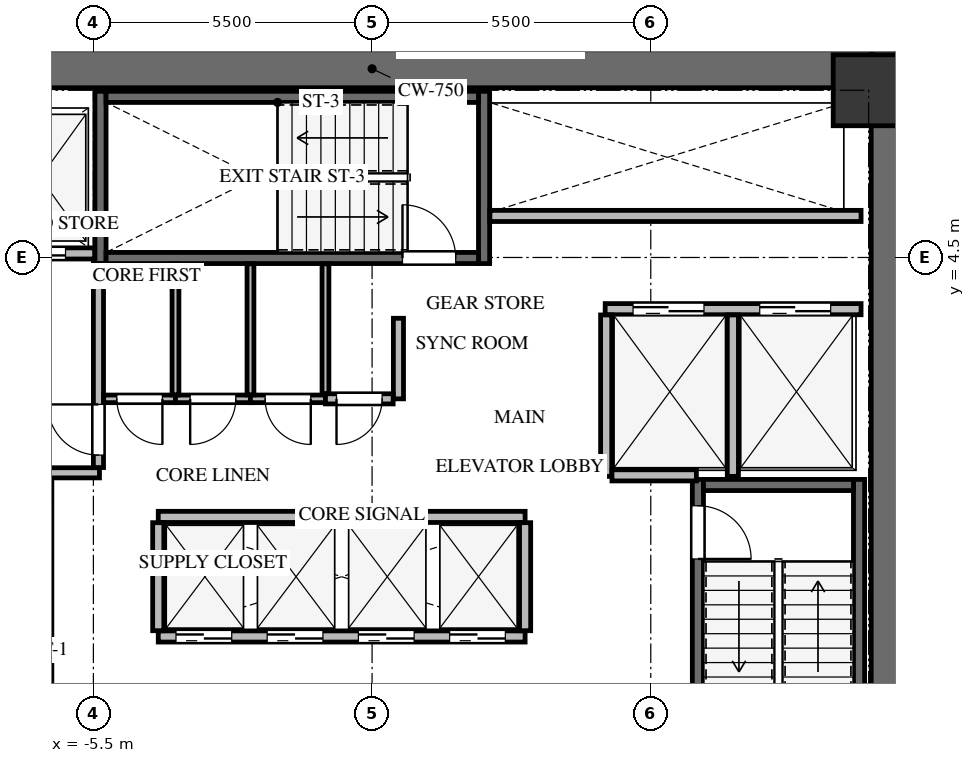
"""IFC4 building model, lengths in metres.
Left out: names, types, materials, properties, quantities, classifications, styles, units other than length and angle.
Written with IfcOpenShell. Run it as: python <this file> out.ifc"""

import sys

from ifc_helpers import new_model, si_unit, direction, frame, frame_2d, origin, origin_2d, place, context, subcontext, project, spatial, rectangle, extrude, source, transform, mapped, element, fill, save


model = new_model("IFC4")
c1 = context("Model", 3, precision=1e-05, world=origin(), true_north=direction((0.0, 1.0)))
c2 = subcontext(c1, "Body", "Model", "MODEL_VIEW")
j1 = project(units=[si_unit("LENGTHUNIT", "METRE"), si_unit("PLANEANGLEUNIT", "RADIAN")], contexts=[c1])
p1 = place(None, origin())
s1 = spatial("IfcSite", under=j1, at=p1, CompositionType="ELEMENT")
p2 = place(p1, origin())
s2 = spatial("IfcBuilding", under=s1, at=p2, CompositionType="ELEMENT")
p3 = place(p2, frame((0.0, 0.0, 110.7)))
s3 = spatial("IfcBuildingStorey", under=s2, at=p3, CompositionType="ELEMENT", Elevation=110.7)
p4 = place(p3, frame((10.225, -8.6, 0.0), z_axis=(0.0, 0.0, 1.0), x_axis=(0.0, 1.0, 0.0)))
e1 = element("IfcWall", 1, at=p4, inside=s3, PredefinedType="SHEAR", context=c2, shape_type="SweptSolid", body=[
    extrude(rectangle(XDim=17.2, YDim=0.75, at=frame_2d((8.6, 0.0))), origin(), (0.0, 0.0, 1.0), 3.3),
])
p5 = place(p3, frame((-9.85, 8.225, 0.0), z_axis=(0.0, 0.0, 1.0), x_axis=(1.0, 0.0, 0.0)))
e2 = element("IfcWall", 2, at=p5, inside=s3, PredefinedType="SHEAR", context=c2, shape_type="SweptSolid", body=[
    extrude(rectangle(XDim=19.7, YDim=0.75, at=frame_2d((9.85, 0.0))), origin(), (0.0, 0.0, 1.0), 3.3),
])
p6 = place(p3, frame((-6.43, -7.77, -0.24), z_axis=(0.0, 0.0, 1.0), x_axis=(0.0, 1.0, 0.0)))
e3 = element("IfcWall", 3, at=p6, inside=s3, PredefinedType="SHEAR", context=c2, shape_type="SweptSolid", body=[
    extrude(rectangle(XDim=7.89, YDim=0.22, at=frame_2d((3.945, 0.0))), origin(), (0.0, 0.0, 1.0), 3.3),
])
p7 = place(p6, frame((6.32, 0.0, 0.0)))
e4 = element("IfcOpeningElement", 4, at=p7, cuts=e3, PredefinedType="OPENING", context=c2, shape_type="SweptSolid", body=[
    extrude(rectangle(XDim=1.05, YDim=2.15, at=frame_2d((0.525, 1.075))), frame((0.0, 0.12, 0.0), z_axis=(0.0, -1.0, 0.0), x_axis=(1.0, 0.0, 0.0)), (0.0, 0.0, 1.0), 0.24),
])
p8 = place(p3, frame((9.61, -7.77, -0.24), z_axis=(0.0, 0.0, 1.0), x_axis=(0.0, 1.0, 0.0)))
e5 = element("IfcWall", 5, at=p8, inside=s3, PredefinedType="SHEAR", context=c2, shape_type="SweptSolid", body=[
    extrude(rectangle(XDim=7.89, YDim=0.22, at=frame_2d((3.945, 0.0))), origin(), (0.0, 0.0, 1.0), 3.3),
])
p9 = place(p3, frame((6.43, 0.12, -0.24), z_axis=(0.0, 0.0, 1.0), x_axis=(0.0, -1.0, 0.0)))
e6 = element("IfcWall", 6, at=p9, inside=s3, PredefinedType="SHEAR", context=c2, shape_type="SweptSolid", body=[
    extrude(rectangle(XDim=7.89, YDim=0.22, at=frame_2d((3.945, 0.0))), origin(), (0.0, 0.0, 1.0), 3.3),
])
p10 = place(p9, frame((0.52, 0.0, 0.0)))
e7 = element("IfcOpeningElement", 7, at=p10, cuts=e6, PredefinedType="OPENING", context=c2, shape_type="SweptSolid", body=[
    extrude(rectangle(XDim=1.05, YDim=2.15, at=frame_2d((0.525, 1.075))), frame((0.0, 0.12, 0.0), z_axis=(0.0, -1.0, 0.0), x_axis=(1.0, 0.0, 0.0)), (0.0, 0.0, 1.0), 0.24),
])
p11 = place(p3, frame((9.5, 0.01, -0.24), z_axis=(0.0, 0.0, 1.0), x_axis=(-1.0, 0.0, 0.0)))
e8 = element("IfcWall", 8, at=p11, inside=s3, PredefinedType="SHEAR", context=c2, shape_type="SweptSolid", body=[
    extrude(rectangle(XDim=2.96, YDim=0.22, at=frame_2d((1.48, 0.0))), origin(), (0.0, 0.0, 1.0), 3.3),
])
for number, where, z_axis, x_axis in (
    (9, (2.21, 4.38, -0.24), (0.0, 0.0, 1.0), (0.0, 1.0, 0.0)),
    (10, (-5.36, 7.78, -0.24), (0.0, 0.0, 1.0), (0.0, -1.0, 0.0)),
):
    element("IfcWall", number, at=place(p3, frame(where, z_axis=z_axis, x_axis=x_axis)), inside=s3, PredefinedType="SHEAR", context=c2, shape_type="SweptSolid", body=[
        extrude(rectangle(XDim=3.4, YDim=0.22, at=frame_2d((1.7, 0.0))), origin(), (0.0, 0.0, 1.0), 3.3),
    ])
p12 = place(p3, frame((-5.25, 4.49, -0.24), z_axis=(0.0, 0.0, 1.0), x_axis=(1.0, 0.0, 0.0)))
e11 = element("IfcWall", 11, at=p12, inside=s3, PredefinedType="SHEAR", context=c2, shape_type="SweptSolid", body=[
    extrude(rectangle(XDim=7.35, YDim=0.22, at=frame_2d((3.675, 0.0))), origin(), (0.0, 0.0, 1.0), 3.3),
])
p13 = place(p12, frame((5.85, 0.0, 0.0)))
e12 = element("IfcOpeningElement", 12, at=p13, cuts=e11, PredefinedType="OPENING", context=c2, shape_type="SweptSolid", body=[
    extrude(rectangle(XDim=1.05, YDim=2.15, at=frame_2d((0.525, 1.075))), frame((0.0, 0.12, 0.0), z_axis=(0.0, -1.0, 0.0), x_axis=(1.0, 0.0, 0.0)), (0.0, 0.0, 1.0), 0.24),
])
p14 = place(p3, frame((2.1, 7.67, -0.24), z_axis=(0.0, 0.0, 1.0), x_axis=(-1.0, 0.0, 0.0)))
e13 = element("IfcWall", 13, at=p14, inside=s3, PredefinedType="SHEAR", context=c2, shape_type="SweptSolid", body=[
    extrude(rectangle(XDim=7.35, YDim=0.22, at=frame_2d((3.675, 0.0))), origin(), (0.0, 0.0, 1.0), 3.3),
])
m1 = source(origin(), c2, "Body", "SweptSolid", [
    extrude(rectangle(XDim=1.4, YDim=1.4, at=origin_2d()), origin(), (0.0, 0.0, 1.0), 3.3),
])
p15 = place(p3, frame((9.8, 7.8, -0.24), z_axis=(0.0, 0.0, 1.0), x_axis=(1.0, 0.0, 0.0)))
e14 = element("IfcColumn", 14, at=p15, inside=s3, PredefinedType="COLUMN", context=c2, shape_type="MappedRepresentation", body=[
    mapped(m1, transform((0.0, 0.0, 0.0), x_axis=(1.0, 0.0, 0.0), y_axis=(0.0, 1.0, 0.0), z_axis=(0.0, 0.0, 1.0), scale=1.0)),
])
p16 = place(p3, frame((-9.65, 4.58, 0.0), z_axis=(0.0, 0.0, 1.0), x_axis=(1.0, 0.0, 0.0)))
e15 = element("IfcWall", 15, at=p16, inside=s3, PredefinedType="SOLIDWALL", context=c2, shape_type="SweptSolid", body=[
    extrude(rectangle(XDim=4.175, YDim=0.22, at=frame_2d((2.087, 0.0))), origin(), (0.0, 0.0, 1.0), 3.045),
])
p17 = place(p16, frame((0.4, 0.0, 0.0)))
e16 = element("IfcOpeningElement", 16, at=p17, cuts=e15, PredefinedType="OPENING", context=c2, shape_type="SweptSolid", body=[
    extrude(rectangle(XDim=1.2, YDim=2.15, at=frame_2d((0.6, 1.075))), frame((0.0, 0.12, 0.0), z_axis=(0.0, -1.0, 0.0), x_axis=(1.0, 0.0, 0.0)), (0.0, 0.0, 1.0), 0.24),
])
p18 = place(p16, frame((2.4, 0.0, 0.0)))
e17 = element("IfcOpeningElement", 17, at=p18, cuts=e15, PredefinedType="OPENING", context=c2, shape_type="SweptSolid", body=[
    extrude(rectangle(XDim=1.2, YDim=2.15, at=frame_2d((0.6, 1.075))), frame((0.0, 0.12, 0.0), z_axis=(0.0, -1.0, 0.0), x_axis=(1.0, 0.0, 0.0)), (0.0, 0.0, 1.0), 0.24),
])
p19 = place(p3, frame((-9.65, 0.25, 0.0), z_axis=(0.0, 0.0, 1.0), x_axis=(1.0, 0.0, 0.0)))
e18 = element("IfcWall", 18, at=p19, inside=s3, PredefinedType="SOLIDWALL", context=c2, shape_type="SweptSolid", body=[
    extrude(rectangle(XDim=4.27, YDim=0.2, at=frame_2d((2.135, 0.0))), origin(), (0.0, 0.0, 1.0), 3.045),
])
p20 = place(p3, frame((-5.4, 0.354, 0.0), z_axis=(0.0, 0.0, 1.0), x_axis=(0.0, 1.0, 0.0)))
e19 = element("IfcWall", 19, at=p20, inside=s3, PredefinedType="SOLIDWALL", context=c2, shape_type="SweptSolid", body=[
    extrude(rectangle(XDim=4.026, YDim=0.2, at=frame_2d((2.013, 0.0))), origin(), (0.0, 0.0, 1.0), 3.045),
])
p21 = place(p20, frame((0.246, 0.0, 0.0)))
e20 = element("IfcOpeningElement", 20, at=p21, cuts=e19, PredefinedType="OPENING", context=c2, shape_type="SweptSolid", body=[
    extrude(rectangle(XDim=1.0, YDim=2.15, at=frame_2d((0.5, 1.075))), frame((0.0, 0.11, 0.0), z_axis=(0.0, -1.0, 0.0), x_axis=(1.0, 0.0, 0.0)), (0.0, 0.0, 1.0), 0.22),
])
p22 = place(p3, frame((4.6, 3.48, 0.0), z_axis=(0.0, 0.0, 1.0), x_axis=(1.0, 0.0, 0.0)))
e21 = element("IfcWall", 21, at=p22, inside=s3, PredefinedType="SOLIDWALL", context=c2, shape_type="SweptSolid", body=[
    extrude(rectangle(XDim=5.05, YDim=0.22, at=frame_2d((2.525, 0.0))), origin(), (0.0, 0.0, 1.0), 3.045),
])
p23 = place(p22, frame((0.55, 0.0, 0.0)))
e22 = element("IfcOpeningElement", 22, at=p23, cuts=e21, PredefinedType="OPENING", context=c2, shape_type="SweptSolid", body=[
    extrude(rectangle(XDim=1.4, YDim=2.15, at=frame_2d((0.7, 1.075))), frame((0.0, 0.12, 0.0), z_axis=(0.0, -1.0, 0.0), x_axis=(1.0, 0.0, 0.0)), (0.0, 0.0, 1.0), 0.24),
])
p24 = place(p22, frame((3.05, 0.0, 0.0)))
e23 = element("IfcOpeningElement", 23, at=p24, cuts=e21, PredefinedType="OPENING", context=c2, shape_type="SweptSolid", body=[
    extrude(rectangle(XDim=1.4, YDim=2.15, at=frame_2d((0.7, 1.075))), frame((0.0, 0.12, 0.0), z_axis=(0.0, -1.0, 0.0), x_axis=(1.0, 0.0, 0.0)), (0.0, 0.0, 1.0), 0.24),
])
for number, where, z_axis, x_axis in (
    (24, (4.62, 0.18, 0.0), (0.0, 0.0, 1.0), (0.0, 1.0, 0.0)),
    (25, (7.12, 0.18, 0.0), (0.0, 0.0, 1.0), (0.0, 1.0, 0.0)),
):
    element("IfcWall", number, at=place(p3, frame(where, z_axis=z_axis, x_axis=x_axis)), inside=s3, PredefinedType="SOLIDWALL", context=c2, shape_type="SweptSolid", body=[
        extrude(rectangle(XDim=3.186, YDim=0.22, at=frame_2d((1.593, 0.0))), origin(), (0.0, 0.0, 1.0), 3.045),
    ])
p25 = place(p3, frame((4.734, 0.2, 0.0), z_axis=(0.0, 0.0, 1.0), x_axis=(1.0, 0.0, 0.0)))
e26 = element("IfcWall", 26, at=p25, inside=s3, PredefinedType="SOLIDWALL", context=c2, shape_type="SweptSolid", body=[
    extrude(rectangle(XDim=1.666, YDim=0.22, at=frame_2d((0.833, 0.0))), origin(), (0.0, 0.0, 1.0), 3.045),
])
p26 = place(p3, frame((-4.22, -2.98, 0.0), z_axis=(0.0, 0.0, 1.0), x_axis=(1.0, 0.0, 0.0)))
e27 = element("IfcWall", 27, at=p26, inside=s3, PredefinedType="SOLIDWALL", context=c2, shape_type="SweptSolid", body=[
    extrude(rectangle(XDim=7.24, YDim=0.22, at=frame_2d((3.62, 0.0))), origin(), (0.0, 0.0, 1.0), 3.045),
])
p27 = place(p26, frame((0.35, 0.0, 0.0)))
e28 = element("IfcOpeningElement", 28, at=p27, cuts=e27, PredefinedType="OPENING", context=c2, shape_type="SweptSolid", body=[
    extrude(rectangle(XDim=1.1, YDim=2.15, at=frame_2d((0.55, 1.075))), frame((0.0, 0.12, 0.0), z_axis=(0.0, -1.0, 0.0), x_axis=(1.0, 0.0, 0.0)), (0.0, 0.0, 1.0), 0.24),
])
p28 = place(p26, frame((2.15, 0.0, 0.0)))
e29 = element("IfcOpeningElement", 29, at=p28, cuts=e27, PredefinedType="OPENING", context=c2, shape_type="SweptSolid", body=[
    extrude(rectangle(XDim=1.1, YDim=2.15, at=frame_2d((0.55, 1.075))), frame((0.0, 0.12, 0.0), z_axis=(0.0, -1.0, 0.0), x_axis=(1.0, 0.0, 0.0)), (0.0, 0.0, 1.0), 0.24),
])
p29 = place(p26, frame((3.95, 0.0, 0.0)))
e30 = element("IfcOpeningElement", 30, at=p29, cuts=e27, PredefinedType="OPENING", context=c2, shape_type="SweptSolid", body=[
    extrude(rectangle(XDim=1.1, YDim=2.15, at=frame_2d((0.55, 1.075))), frame((0.0, 0.12, 0.0), z_axis=(0.0, -1.0, 0.0), x_axis=(1.0, 0.0, 0.0)), (0.0, 0.0, 1.0), 0.24),
])
p30 = place(p26, frame((5.75, 0.0, 0.0)))
e31 = element("IfcOpeningElement", 31, at=p30, cuts=e27, PredefinedType="OPENING", context=c2, shape_type="SweptSolid", body=[
    extrude(rectangle(XDim=1.1, YDim=2.15, at=frame_2d((0.55, 1.075))), frame((0.0, 0.12, 0.0), z_axis=(0.0, -1.0, 0.0), x_axis=(1.0, 0.0, 0.0)), (0.0, 0.0, 1.0), 0.24),
])
p31 = place(p3, frame((-4.22, -0.62, 0.0), z_axis=(0.0, 0.0, 1.0), x_axis=(1.0, 0.0, 0.0)))
e32 = element("IfcWall", 32, at=p31, inside=s3, PredefinedType="SOLIDWALL", context=c2, shape_type="SweptSolid", body=[
    extrude(rectangle(XDim=7.24, YDim=0.22, at=frame_2d((3.62, 0.0))), origin(), (0.0, 0.0, 1.0), 3.045),
])
for number, where, z_axis, x_axis in (
    (33, (-4.22, -2.866, 0.0), (0.0, 0.0, 1.0), (0.0, 1.0, 0.0)),
    (34, (3.02, -2.866, 0.0), (0.0, 0.0, 1.0), (0.0, 1.0, 0.0)),
):
    element("IfcWall", number, at=place(p3, frame(where, z_axis=z_axis, x_axis=x_axis)), inside=s3, PredefinedType="SOLIDWALL", context=c2, shape_type="SweptSolid", body=[
        extrude(rectangle(XDim=2.132, YDim=0.22, at=frame_2d((1.066, 0.0))), origin(), (0.0, 0.0, 1.0), 3.045),
    ])
p32 = place(p3, frame((2.325, 5.32, 0.0), z_axis=(0.0, 0.0, 1.0), x_axis=(1.0, 0.0, 0.0)))
e35 = element("IfcWall", 35, at=p32, inside=s3, PredefinedType="SOLIDWALL", context=c2, shape_type="SweptSolid", body=[
    extrude(rectangle(XDim=7.325, YDim=0.22, at=frame_2d((3.663, 0.0))), origin(), (0.0, 0.0, 1.0), 3.045),
])
p33 = place(p3, frame((-3.88, 1.71, 0.0), z_axis=(0.0, 0.0, 1.0), x_axis=(-1.0, 0.0, 0.0)))
e36 = element("IfcWall", 36, at=p33, inside=s3, PredefinedType="PARTITIONING", context=c2, shape_type="SweptSolid", body=[
    extrude(rectangle(XDim=1.416, YDim=0.15, at=frame_2d((0.708, 0.0))), origin(), (0.0, 0.0, 1.0), 3.045),
])
p34 = place(p33, frame((0.258, 0.0, 0.0)))
e37 = element("IfcOpeningElement", 37, at=p34, cuts=e36, PredefinedType="OPENING", context=c2, shape_type="SweptSolid", body=[
    extrude(rectangle(XDim=0.9, YDim=2.05, at=frame_2d((0.45, 1.025))), frame((0.0, 0.085, 0.0), z_axis=(0.0, -1.0, 0.0), x_axis=(1.0, 0.0, 0.0)), (0.0, 0.0, 1.0), 0.17),
])
p35 = place(p3, frame((-2.4, 1.71, 0.0), z_axis=(0.0, 0.0, 1.0), x_axis=(-1.0, 0.0, 0.0)))
e38 = element("IfcWall", 38, at=p35, inside=s3, PredefinedType="PARTITIONING", context=c2, shape_type="SweptSolid", body=[
    extrude(rectangle(XDim=1.48, YDim=0.15, at=frame_2d((0.74, 0.0))), origin(), (0.0, 0.0, 1.0), 3.045),
])
p36 = place(p35, frame((0.29, 0.0, 0.0)))
e39 = element("IfcOpeningElement", 39, at=p36, cuts=e38, PredefinedType="OPENING", context=c2, shape_type="SweptSolid", body=[
    extrude(rectangle(XDim=0.9, YDim=2.05, at=frame_2d((0.45, 1.025))), frame((0.0, 0.085, 0.0), z_axis=(0.0, -1.0, 0.0), x_axis=(1.0, 0.0, 0.0)), (0.0, 0.0, 1.0), 0.17),
])
p37 = place(p3, frame((-0.92, 1.71, 0.0), z_axis=(0.0, 0.0, 1.0), x_axis=(-1.0, 0.0, 0.0)))
e40 = element("IfcWall", 40, at=p37, inside=s3, PredefinedType="PARTITIONING", context=c2, shape_type="SweptSolid", body=[
    extrude(rectangle(XDim=1.48, YDim=0.15, at=frame_2d((0.74, 0.0))), origin(), (0.0, 0.0, 1.0), 3.045),
])
p38 = place(p37, frame((0.29, 0.0, 0.0)))
e41 = element("IfcOpeningElement", 41, at=p38, cuts=e40, PredefinedType="OPENING", context=c2, shape_type="SweptSolid", body=[
    extrude(rectangle(XDim=0.9, YDim=2.05, at=frame_2d((0.45, 1.025))), frame((0.0, 0.085, 0.0), z_axis=(0.0, -1.0, 0.0), x_axis=(1.0, 0.0, 0.0)), (0.0, 0.0, 1.0), 0.17),
])
p39 = place(p3, frame((0.52, 3.3, 0.0), z_axis=(0.0, 0.0, 1.0), x_axis=(0.0, -1.0, 0.0)))
e42 = element("IfcWall", 42, at=p39, inside=s3, PredefinedType="SOLIDWALL", context=c2, shape_type="SweptSolid", body=[
    extrude(rectangle(XDim=1.59, YDim=0.2, at=frame_2d((0.795, 0.0))), origin(), (0.0, 0.0, 1.0), 3.045),
])
p40 = place(p3, frame((0.416, 1.71, 0.0), z_axis=(0.0, 0.0, 1.0), x_axis=(-1.0, 0.0, 0.0)))
e43 = element("IfcWall", 43, at=p40, inside=s3, PredefinedType="SOLIDWALL", context=c2, shape_type="SweptSolid", body=[
    extrude(rectangle(XDim=1.336, YDim=0.2, at=frame_2d((0.668, 0.0))), origin(), (0.0, 0.0, 1.0), 3.045),
])
p41 = place(p40, frame((0.218, 0.0, 0.0)))
e44 = element("IfcOpeningElement", 44, at=p41, cuts=e43, PredefinedType="OPENING", context=c2, shape_type="SweptSolid", body=[
    extrude(rectangle(XDim=0.9, YDim=2.05, at=frame_2d((0.45, 1.025))), frame((0.0, 0.11, 0.0), z_axis=(0.0, -1.0, 0.0), x_axis=(1.0, 0.0, 0.0)), (0.0, 0.0, 1.0), 0.22),
])
for number, where, z_axis, x_axis in (
    (45, (-3.88, 4.375, 0.0), (0.0, 0.0, 1.0), (0.0, -1.0, 0.0)),
    (46, (-2.4, 4.375, 0.0), (0.0, 0.0, 1.0), (0.0, -1.0, 0.0)),
):
    element("IfcWall", number, at=place(p3, frame(where, z_axis=z_axis, x_axis=x_axis)), inside=s3, PredefinedType="PARTITIONING", context=c2, shape_type="SweptSolid", body=[
        extrude(rectangle(XDim=2.586, YDim=0.135, at=frame_2d((1.293, 0.0))), origin(), (0.0, 0.0, 1.0), 3.045),
    ])
p42 = place(p3, frame((-0.92, 4.375, 0.0), z_axis=(0.0, 0.0, 1.0), x_axis=(0.0, -1.0, 0.0)))
e47 = element("IfcWall", 47, at=p42, inside=s3, PredefinedType="PARTITIONING", context=c2, shape_type="SweptSolid", body=[
    extrude(rectangle(XDim=2.561, YDim=0.135, at=frame_2d((1.281, 0.0))), origin(), (0.0, 0.0, 1.0), 3.045),
])
m2 = source(origin(), c2, "Body", "SweptSolid", [
    extrude(rectangle(XDim=1.05, YDim=2.15, at=frame_2d((0.525, 1.075))), frame((0.0, 0.025, 0.0), z_axis=(0.0, -1.0, 0.0), x_axis=(1.0, 0.0, 0.0)), (0.0, 0.0, 1.0), 0.05),
])
p43 = place(p10, origin())
e48 = element("IfcDoor", 48, at=p43, inside=s3, OperationType="SINGLE_SWING_RIGHT", PredefinedType="DOOR", context=c2, shape_type="MappedRepresentation", body=[
    mapped(m2, transform((0.0, 0.0, 0.0), x_axis=(1.0, 0.0, 0.0), y_axis=(0.0, 1.0, 0.0), z_axis=(0.0, 0.0, 1.0), scale=1.0)),
])
fill(e7, e48)
m3 = source(origin(), c2, "Body", "SweptSolid", [
    extrude(rectangle(XDim=1.05, YDim=2.15, at=frame_2d((0.525, 1.075))), frame((0.0, 0.025, 0.0), z_axis=(0.0, -1.0, 0.0), x_axis=(1.0, 0.0, 0.0)), (0.0, 0.0, 1.0), 0.05),
])
p44 = place(p13, origin())
e49 = element("IfcDoor", 49, at=p44, inside=s3, OperationType="SINGLE_SWING_LEFT", PredefinedType="DOOR", context=c2, shape_type="MappedRepresentation", body=[
    mapped(m3, transform((0.0, 0.0, 0.0), x_axis=(1.0, 0.0, 0.0), y_axis=(0.0, 1.0, 0.0), z_axis=(0.0, 0.0, 1.0), scale=1.0)),
])
fill(e12, e49)
m4 = source(origin(), c2, "Body", "SweptSolid", [
    extrude(rectangle(XDim=1.2, YDim=2.15, at=frame_2d((0.6, 1.075))), frame((0.0, 0.025, 0.0), z_axis=(0.0, -1.0, 0.0), x_axis=(1.0, 0.0, 0.0)), (0.0, 0.0, 1.0), 0.05),
])
p45 = place(p18, origin())
e50 = element("IfcDoor", 50, at=p45, inside=s3, OperationType="DOUBLE_DOOR_SLIDING", PredefinedType="DOOR", context=c2, shape_type="MappedRepresentation", body=[
    mapped(m4, transform((0.0, 0.0, 0.0), x_axis=(1.0, 0.0, 0.0), y_axis=(0.0, 1.0, 0.0), z_axis=(0.0, 0.0, 1.0), scale=1.0)),
])
fill(e17, e50)
m5 = source(origin(), c2, "Body", "SweptSolid", [
    extrude(rectangle(XDim=1.0, YDim=2.15, at=frame_2d((0.5, 1.075))), frame((0.0, 0.025, 0.0), z_axis=(0.0, -1.0, 0.0), x_axis=(1.0, 0.0, 0.0)), (0.0, 0.0, 1.0), 0.05),
])
p46 = place(p21, origin())
e51 = element("IfcDoor", 51, at=p46, inside=s3, OperationType="SINGLE_SWING_RIGHT", PredefinedType="DOOR", context=c2, shape_type="MappedRepresentation", body=[
    mapped(m5, transform((0.0, 0.0, 0.0), x_axis=(1.0, 0.0, 0.0), y_axis=(0.0, 1.0, 0.0), z_axis=(0.0, 0.0, 1.0), scale=1.0)),
])
fill(e20, e51)
m6 = source(origin(), c2, "Body", "SweptSolid", [
    extrude(rectangle(XDim=1.4, YDim=2.15, at=frame_2d((0.7, 1.075))), frame((0.0, 0.025, 0.0), z_axis=(0.0, -1.0, 0.0), x_axis=(1.0, 0.0, 0.0)), (0.0, 0.0, 1.0), 0.05),
])
p47 = place(p23, origin())
e52 = element("IfcDoor", 52, at=p47, inside=s3, OperationType="DOUBLE_DOOR_SLIDING", PredefinedType="DOOR", context=c2, shape_type="MappedRepresentation", body=[
    mapped(m6, transform((0.0, 0.0, 0.0), x_axis=(1.0, 0.0, 0.0), y_axis=(0.0, 1.0, 0.0), z_axis=(0.0, 0.0, 1.0), scale=1.0)),
])
fill(e22, e52)
p48 = place(p24, origin())
e53 = element("IfcDoor", 53, at=p48, inside=s3, OperationType="DOUBLE_DOOR_SLIDING", PredefinedType="DOOR", context=c2, shape_type="MappedRepresentation", body=[
    mapped(m6, transform((0.0, 0.0, 0.0), x_axis=(1.0, 0.0, 0.0), y_axis=(0.0, 1.0, 0.0), z_axis=(0.0, 0.0, 1.0), scale=1.0)),
])
fill(e23, e53)
m7 = source(origin(), c2, "Body", "SweptSolid", [
    extrude(rectangle(XDim=1.1, YDim=2.15, at=frame_2d((0.55, 1.075))), frame((0.0, 0.025, 0.0), z_axis=(0.0, -1.0, 0.0), x_axis=(1.0, 0.0, 0.0)), (0.0, 0.0, 1.0), 0.05),
])
p49 = place(p27, origin())
e54 = element("IfcDoor", 54, at=p49, inside=s3, OperationType="DOUBLE_DOOR_SLIDING", PredefinedType="DOOR", context=c2, shape_type="MappedRepresentation", body=[
    mapped(m7, transform((0.0, 0.0, 0.0), x_axis=(1.0, 0.0, 0.0), y_axis=(0.0, 1.0, 0.0), z_axis=(0.0, 0.0, 1.0), scale=1.0)),
])
fill(e28, e54)
p50 = place(p28, origin())
e55 = element("IfcDoor", 55, at=p50, inside=s3, OperationType="DOUBLE_DOOR_SLIDING", PredefinedType="DOOR", context=c2, shape_type="MappedRepresentation", body=[
    mapped(m7, transform((0.0, 0.0, 0.0), x_axis=(1.0, 0.0, 0.0), y_axis=(0.0, 1.0, 0.0), z_axis=(0.0, 0.0, 1.0), scale=1.0)),
])
fill(e29, e55)
p51 = place(p29, origin())
e56 = element("IfcDoor", 56, at=p51, inside=s3, OperationType="DOUBLE_DOOR_SLIDING", PredefinedType="DOOR", context=c2, shape_type="MappedRepresentation", body=[
    mapped(m7, transform((0.0, 0.0, 0.0), x_axis=(1.0, 0.0, 0.0), y_axis=(0.0, 1.0, 0.0), z_axis=(0.0, 0.0, 1.0), scale=1.0)),
])
fill(e30, e56)
p52 = place(p30, origin())
e57 = element("IfcDoor", 57, at=p52, inside=s3, OperationType="DOUBLE_DOOR_SLIDING", PredefinedType="DOOR", context=c2, shape_type="MappedRepresentation", body=[
    mapped(m7, transform((0.0, 0.0, 0.0), x_axis=(1.0, 0.0, 0.0), y_axis=(0.0, 1.0, 0.0), z_axis=(0.0, 0.0, 1.0), scale=1.0)),
])
fill(e31, e57)
m8 = source(origin(), c2, "Body", "SweptSolid", [
    extrude(rectangle(XDim=0.9, YDim=2.05, at=frame_2d((0.45, 1.025))), frame((0.0, 0.025, 0.0), z_axis=(0.0, -1.0, 0.0), x_axis=(1.0, 0.0, 0.0)), (0.0, 0.0, 1.0), 0.05),
])
p53 = place(p34, origin())
e58 = element("IfcDoor", 58, at=p53, inside=s3, OperationType="SINGLE_SWING_LEFT", PredefinedType="DOOR", context=c2, shape_type="MappedRepresentation", body=[
    mapped(m8, transform((0.0, 0.0, 0.0), x_axis=(1.0, 0.0, 0.0), y_axis=(0.0, 1.0, 0.0), z_axis=(0.0, 0.0, 1.0), scale=1.0)),
])
fill(e37, e58)
m9 = source(origin(), c2, "Body", "SweptSolid", [
    extrude(rectangle(XDim=0.9, YDim=2.05, at=frame_2d((0.45, 1.025))), frame((0.0, 0.025, 0.0), z_axis=(0.0, -1.0, 0.0), x_axis=(1.0, 0.0, 0.0)), (0.0, 0.0, 1.0), 0.05),
])
p54 = place(p36, origin())
e59 = element("IfcDoor", 59, at=p54, inside=s3, OperationType="SINGLE_SWING_RIGHT", PredefinedType="DOOR", context=c2, shape_type="MappedRepresentation", body=[
    mapped(m9, transform((0.0, 0.0, 0.0), x_axis=(1.0, 0.0, 0.0), y_axis=(0.0, 1.0, 0.0), z_axis=(0.0, 0.0, 1.0), scale=1.0)),
])
fill(e39, e59)
p55 = place(p38, origin())
e60 = element("IfcDoor", 60, at=p55, inside=s3, OperationType="SINGLE_SWING_LEFT", PredefinedType="DOOR", context=c2, shape_type="MappedRepresentation", body=[
    mapped(m8, transform((0.0, 0.0, 0.0), x_axis=(1.0, 0.0, 0.0), y_axis=(0.0, 1.0, 0.0), z_axis=(0.0, 0.0, 1.0), scale=1.0)),
])
fill(e41, e60)
p56 = place(p41, origin())
e61 = element("IfcDoor", 61, at=p56, inside=s3, OperationType="SINGLE_SWING_RIGHT", PredefinedType="DOOR", context=c2, shape_type="MappedRepresentation", body=[
    mapped(m9, transform((0.0, 0.0, 0.0), x_axis=(1.0, 0.0, 0.0), y_axis=(0.0, 1.0, 0.0), z_axis=(0.0, 0.0, 1.0), scale=1.0)),
])
fill(e44, e61)
save(model, sys.argv[1])
